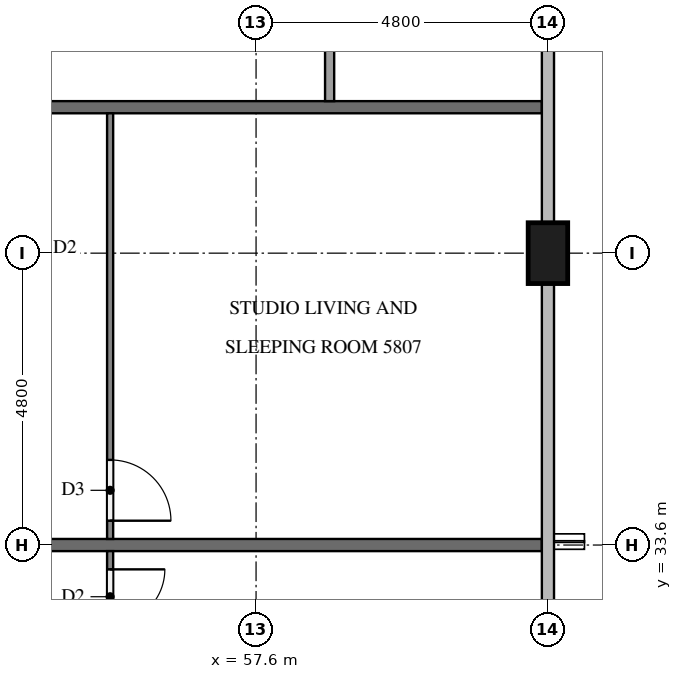
"""IFC4 building model, lengths in metres.
Left out: names, types, materials, properties, quantities, classifications, styles, units other than length and angle.
Written with IfcOpenShell. Run it as: python <this file> out.ifc"""

import sys

from ifc_helpers import new_model, si_unit, direction, frame, frame_2d, origin, origin_2d, place, context, subcontext, project, spatial, rectangle, extrude, element, fill, save


model = new_model("IFC4")
c1 = context("Model", 3, precision=1e-05, world=origin(), true_north=direction((0.0, 1.0)))
c2 = subcontext(c1, "Body", "Model", "MODEL_VIEW")
j1 = project(units=[si_unit("LENGTHUNIT", "METRE"), si_unit("PLANEANGLEUNIT", "RADIAN")], contexts=[c1])
p1 = place(None, origin())
s1 = spatial("IfcSite", under=j1, at=p1, CompositionType="ELEMENT")
p2 = place(p1, origin())
s2 = spatial("IfcBuilding", under=s1, at=p2, CompositionType="ELEMENT")
p3 = place(p2, frame((0.0, 0.0, 222.8)))
s3 = spatial("IfcBuildingStorey", under=s2, at=p3, CompositionType="ELEMENT", Elevation=222.8)
p4 = place(p3, frame((62.4, 38.4, 0.0), z_axis=(0.0, 0.0, 1.0), x_axis=(0.0, 1.0, 0.0)))
e1 = element("IfcColumn", 1, at=p4, inside=s3, PredefinedType="COLUMN", context=c2, shape_type="SweptSolid", body=[
    extrude(rectangle(XDim=1.0, YDim=0.65, at=origin_2d()), origin(), (0.0, 0.0, 1.0), 3.2),
])
for number, where, z_axis, x_axis in (
    (2, (50.5, 33.6, 0.0), (0.0, 0.0, 1.0), (1.0, 0.0, 0.0)),
    (3, (50.5, 40.8, 0.0), (0.0, 0.0, 1.0), (1.0, 0.0, 0.0)),
):
    element("IfcWall", number, at=place(p3, frame(where, z_axis=z_axis, x_axis=x_axis)), inside=s3, PredefinedType="PARTITIONING", context=c2, shape_type="SweptSolid", body=[
        extrude(rectangle(XDim=11.8, YDim=0.2, at=frame_2d((5.9, 0.0))), origin(), (0.0, 0.0, 1.0), 3.2),
    ])
p5 = place(p3, frame((55.2, 33.5, 0.0), z_axis=(0.0, 0.0, 1.0), x_axis=(0.0, -1.0, 0.0)))
e4 = element("IfcWall", 4, at=p5, inside=s3, PredefinedType="PARTITIONING", context=c2, shape_type="SweptSolid", body=[
    extrude(rectangle(XDim=14.2, YDim=0.1, at=frame_2d((7.1, 0.0))), origin(), (0.0, 0.0, 1.0), 3.2),
])
p6 = place(p5, frame((0.3, 0.0, 0.0)))
e5 = element("IfcOpeningElement", 5, at=p6, cuts=e4, PredefinedType="OPENING", context=c2, shape_type="SweptSolid", body=[
    extrude(rectangle(XDim=0.9, YDim=2.1, at=frame_2d((0.45, 1.05))), frame((0.0, 0.06, 0.0), z_axis=(0.0, -1.0, 0.0), x_axis=(1.0, 0.0, 0.0)), (0.0, 0.0, 1.0), 0.12),
])
p7 = place(p5, frame((8.25, 0.0, 0.0)))
e6 = element("IfcOpeningElement", 6, at=p7, cuts=e4, PredefinedType="OPENING", context=c2, shape_type="SweptSolid", body=[
    extrude(rectangle(XDim=0.9, YDim=2.1, at=frame_2d((0.45, 1.05))), frame((0.0, 0.06, 0.0), z_axis=(0.0, -1.0, 0.0), x_axis=(1.0, 0.0, 0.0)), (0.0, 0.0, 1.0), 0.12),
])
p8 = place(p5, frame((9.85, 0.0, 0.0)))
e7 = element("IfcOpeningElement", 7, at=p8, cuts=e4, PredefinedType="OPENING", context=c2, shape_type="SweptSolid", body=[
    extrude(rectangle(XDim=1.0, YDim=2.1, at=frame_2d((0.5, 1.05))), frame((0.0, 0.06, 0.0), z_axis=(0.0, -1.0, 0.0), x_axis=(1.0, 0.0, 0.0)), (0.0, 0.0, 1.0), 0.12),
])
p9 = place(p3, frame((55.2, 40.7, 0.0), z_axis=(0.0, 0.0, 1.0), x_axis=(0.0, -1.0, 0.0)))
e8 = element("IfcWall", 8, at=p9, inside=s3, PredefinedType="PARTITIONING", context=c2, shape_type="SweptSolid", body=[
    extrude(rectangle(XDim=7.0, YDim=0.1, at=frame_2d((3.5, 0.0))), origin(), (0.0, 0.0, 1.0), 3.2),
])
p10 = place(p9, frame((5.7, 0.0, 0.0)))
e9 = element("IfcOpeningElement", 9, at=p10, cuts=e8, PredefinedType="OPENING", context=c2, shape_type="SweptSolid", body=[
    extrude(rectangle(XDim=1.0, YDim=2.1, at=frame_2d((0.5, 1.05))), frame((0.0, 0.06, 0.0), z_axis=(0.0, -1.0, 0.0), x_axis=(1.0, 0.0, 0.0)), (0.0, 0.0, 1.0), 0.12),
])
p11 = place(p3, frame((58.81, 40.9, 0.0), z_axis=(0.0, 0.0, 1.0), x_axis=(0.0, 1.0, 0.0)))
e10 = element("IfcWall", 10, at=p11, inside=s3, PredefinedType="PARTITIONING", context=c2, shape_type="SweptSolid", body=[
    extrude(rectangle(XDim=2.975, YDim=0.15, at=frame_2d((1.488, 0.0))), origin(), (0.0, 0.0, 1.0), 3.2),
])
p12 = place(p6, origin())
e11 = element("IfcDoor", 11, at=p12, inside=s3, OperationType="SINGLE_SWING_LEFT", PredefinedType="DOOR", context=c2, shape_type="SweptSolid", body=[
    extrude(rectangle(XDim=0.9, YDim=2.1, at=frame_2d((0.45, 1.05))), frame((0.0, 0.025, 0.0), z_axis=(0.0, -1.0, 0.0), x_axis=(1.0, 0.0, 0.0)), (0.0, 0.0, 1.0), 0.05),
])
fill(e5, e11)
p13 = place(p10, origin())
e12 = element("IfcDoor", 12, at=p13, inside=s3, OperationType="SINGLE_SWING_RIGHT", PredefinedType="DOOR", context=c2, shape_type="SweptSolid", body=[
    extrude(rectangle(XDim=1.0, YDim=2.1, at=frame_2d((0.5, 1.05))), frame((0.0, 0.025, 0.0), z_axis=(0.0, -1.0, 0.0), x_axis=(1.0, 0.0, 0.0)), (0.0, 0.0, 1.0), 0.05),
])
fill(e9, e12)
save(model, sys.argv[1])
